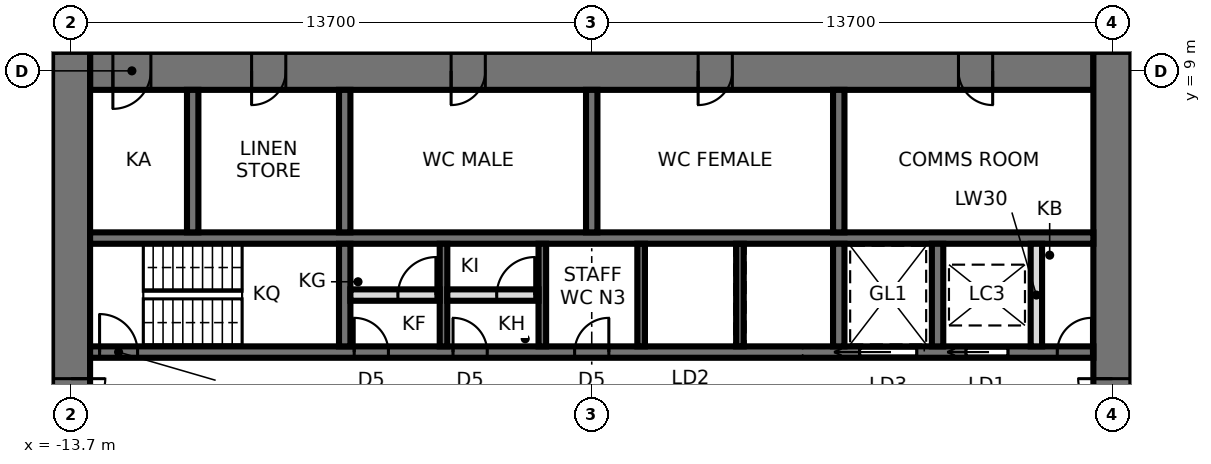
"""IFC4 building model, lengths in metres.
Left out: names, types, materials, properties, quantities, classifications, styles, units other than length and angle.
Written with IfcOpenShell. Run it as: python <this file> out.ifc"""

import sys

from ifc_helpers import new_model, si_unit, direction, frame, frame_2d, origin, place, context, subcontext, project, spatial, rectangle, extrude, element, fill, save


model = new_model("IFC4")
c1 = context("Model", 3, precision=1e-05, world=origin(), true_north=direction((0.0, 1.0)))
c2 = subcontext(c1, "Body", "Model", "MODEL_VIEW")
j1 = project(units=[si_unit("LENGTHUNIT", "METRE"), si_unit("PLANEANGLEUNIT", "RADIAN")], contexts=[c1])
p1 = place(None, origin())
s1 = spatial("IfcSite", under=j1, at=p1, CompositionType="ELEMENT")
p2 = place(p1, origin())
s2 = spatial("IfcBuilding", under=s1, at=p2, CompositionType="ELEMENT")
p3 = place(p2, frame((0.0, 0.0, 211.1)))
s3 = spatial("IfcBuildingStorey", under=s2, at=p3, CompositionType="ELEMENT", Elevation=211.1)
p4 = place(p3, frame((13.2, 9.0, 0.0), z_axis=(0.0, 0.0, 1.0), x_axis=(-1.0, 0.0, 0.0)))
e1 = element("IfcWall", 1, at=p4, inside=s3, PredefinedType="SHEAR", context=c2, shape_type="SweptSolid", body=[
    extrude(rectangle(XDim=26.4, YDim=1.0, at=frame_2d((13.2, 0.0))), origin(), (0.0, 0.0, 1.0), 3.9),
])
p5 = place(p4, frame((2.65, 0.0, 0.0)))
e2 = element("IfcOpeningElement", 2, at=p5, cuts=e1, PredefinedType="OPENING", context=c2, shape_type="SweptSolid", body=[
    extrude(rectangle(XDim=0.9, YDim=2.1, at=frame_2d((0.45, 1.05))), frame((0.0, 0.51, 0.0), z_axis=(0.0, -1.0, 0.0), x_axis=(1.0, 0.0, 0.0)), (0.0, 0.0, 1.0), 1.02),
])
p6 = place(p4, frame((9.5, 0.0, 0.0)))
e3 = element("IfcOpeningElement", 3, at=p6, cuts=e1, PredefinedType="OPENING", context=c2, shape_type="SweptSolid", body=[
    extrude(rectangle(XDim=0.9, YDim=2.1, at=frame_2d((0.45, 1.05))), frame((0.0, 0.51, 0.0), z_axis=(0.0, -1.0, 0.0), x_axis=(1.0, 0.0, 0.0)), (0.0, 0.0, 1.0), 1.02),
])
p7 = place(p4, frame((16.0, 0.0, 0.0)))
e4 = element("IfcOpeningElement", 4, at=p7, cuts=e1, PredefinedType="OPENING", context=c2, shape_type="SweptSolid", body=[
    extrude(rectangle(XDim=0.9, YDim=2.1, at=frame_2d((0.45, 1.05))), frame((0.0, 0.51, 0.0), z_axis=(0.0, -1.0, 0.0), x_axis=(1.0, 0.0, 0.0)), (0.0, 0.0, 1.0), 1.02),
])
p8 = place(p4, frame((21.25, 0.0, 0.0)))
e5 = element("IfcOpeningElement", 5, at=p8, cuts=e1, PredefinedType="OPENING", context=c2, shape_type="SweptSolid", body=[
    extrude(rectangle(XDim=0.9, YDim=2.1, at=frame_2d((0.45, 1.05))), frame((0.0, 0.51, 0.0), z_axis=(0.0, -1.0, 0.0), x_axis=(1.0, 0.0, 0.0)), (0.0, 0.0, 1.0), 1.02),
])
p9 = place(p4, frame((24.8, 0.0, 0.0)))
e6 = element("IfcOpeningElement", 6, at=p9, cuts=e1, PredefinedType="OPENING", context=c2, shape_type="SweptSolid", body=[
    extrude(rectangle(XDim=1.0, YDim=2.1, at=frame_2d((0.5, 1.05))), frame((0.0, 0.51, 0.0), z_axis=(0.0, -1.0, 0.0), x_axis=(1.0, 0.0, 0.0)), (0.0, 0.0, 1.0), 1.02),
])
p10 = place(p3, frame((13.7, -9.5, 0.0), z_axis=(0.0, 0.0, 1.0), x_axis=(0.0, 1.0, 0.0)))
e7 = element("IfcWall", 7, at=p10, inside=s3, PredefinedType="SHEAR", context=c2, shape_type="SweptSolid", body=[
    extrude(rectangle(XDim=19.0, YDim=1.0, at=frame_2d((9.5, 0.0))), origin(), (0.0, 0.0, 1.0), 3.9),
])
p11 = place(p10, frame((8.6, 0.0, 0.0)))
e8 = element("IfcOpeningElement", 8, at=p11, cuts=e7, PredefinedType="OPENING", context=c2, shape_type="SweptSolid", body=[
    extrude(rectangle(XDim=1.8, YDim=2.4, at=frame_2d((0.9, 1.2))), frame((0.0, 0.51, 0.0), z_axis=(0.0, -1.0, 0.0), x_axis=(1.0, 0.0, 0.0)), (0.0, 0.0, 1.0), 1.02),
])
p12 = place(p3, frame((-13.7, 9.5, 0.0), z_axis=(0.0, 0.0, 1.0), x_axis=(0.0, -1.0, 0.0)))
e9 = element("IfcWall", 9, at=p12, inside=s3, PredefinedType="SHEAR", context=c2, shape_type="SweptSolid", body=[
    extrude(rectangle(XDim=19.0, YDim=1.0, at=frame_2d((9.5, 0.0))), origin(), (0.0, 0.0, 1.0), 3.9),
])
p13 = place(p12, frame((8.6, 0.0, 0.0)))
e10 = element("IfcOpeningElement", 10, at=p13, cuts=e9, PredefinedType="OPENING", context=c2, shape_type="SweptSolid", body=[
    extrude(rectangle(XDim=1.8, YDim=2.4, at=frame_2d((0.9, 1.2))), frame((0.0, 0.51, 0.0), z_axis=(0.0, -1.0, 0.0), x_axis=(1.0, 0.0, 0.0)), (0.0, 0.0, 1.0), 1.02),
])
p14 = place(p3, frame((-13.2, 1.6, 0.0), z_axis=(0.0, 0.0, 1.0), x_axis=(1.0, 0.0, 0.0)))
e11 = element("IfcWall", 11, at=p14, inside=s3, PredefinedType="SHEAR", context=c2, shape_type="SweptSolid", body=[
    extrude(rectangle(XDim=26.4, YDim=0.3, at=frame_2d((13.2, 0.0))), origin(), (0.0, 0.0, 1.0), 3.9),
])
p15 = place(p14, frame((0.25, 0.0, 0.0)))
e12 = element("IfcOpeningElement", 12, at=p15, cuts=e11, PredefinedType="OPENING", context=c2, shape_type="SweptSolid", body=[
    extrude(rectangle(XDim=1.0, YDim=2.1, at=frame_2d((0.5, 1.05))), frame((0.0, 0.16, 0.0), z_axis=(0.0, -1.0, 0.0), x_axis=(1.0, 0.0, 0.0)), (0.0, 0.0, 1.0), 0.32),
])
p16 = place(p14, frame((23.05, 0.0, 0.0)))
e13 = element("IfcOpeningElement", 13, at=p16, cuts=e11, PredefinedType="OPENING", context=c2, shape_type="SweptSolid", body=[
    extrude(rectangle(XDim=1.1, YDim=2.3, at=frame_2d((0.55, 1.15))), frame((0.0, 0.16, 0.0), z_axis=(0.0, -1.0, 0.0), x_axis=(1.0, 0.0, 0.0)), (0.0, 0.0, 1.0), 0.32),
])
p17 = place(p14, frame((20.25, 0.0, 0.0)))
e14 = element("IfcOpeningElement", 14, at=p17, cuts=e11, PredefinedType="OPENING", context=c2, shape_type="SweptSolid", body=[
    extrude(rectangle(XDim=1.5, YDim=2.4, at=frame_2d((0.75, 1.2))), frame((0.0, 0.16, 0.0), z_axis=(0.0, -1.0, 0.0), x_axis=(1.0, 0.0, 0.0)), (0.0, 0.0, 1.0), 0.32),
])
p18 = place(p14, frame((6.95, 0.0, 0.0)))
e15 = element("IfcOpeningElement", 15, at=p18, cuts=e11, PredefinedType="OPENING", context=c2, shape_type="SweptSolid", body=[
    extrude(rectangle(XDim=0.9, YDim=2.1, at=frame_2d((0.45, 1.05))), frame((0.0, 0.16, 0.0), z_axis=(0.0, -1.0, 0.0), x_axis=(1.0, 0.0, 0.0)), (0.0, 0.0, 1.0), 0.32),
])
p19 = place(p14, frame((9.55, 0.0, 0.0)))
e16 = element("IfcOpeningElement", 16, at=p19, cuts=e11, PredefinedType="OPENING", context=c2, shape_type="SweptSolid", body=[
    extrude(rectangle(XDim=0.9, YDim=2.1, at=frame_2d((0.45, 1.05))), frame((0.0, 0.16, 0.0), z_axis=(0.0, -1.0, 0.0), x_axis=(1.0, 0.0, 0.0)), (0.0, 0.0, 1.0), 0.32),
])
p20 = place(p14, frame((12.75, 0.0, 0.0)))
e17 = element("IfcOpeningElement", 17, at=p20, cuts=e11, PredefinedType="OPENING", context=c2, shape_type="SweptSolid", body=[
    extrude(rectangle(XDim=0.9, YDim=2.1, at=frame_2d((0.45, 1.05))), frame((0.0, 0.16, 0.0), z_axis=(0.0, -1.0, 0.0), x_axis=(1.0, 0.0, 0.0)), (0.0, 0.0, 1.0), 0.32),
])
p21 = place(p14, frame((25.45, 0.0, 0.0)))
e18 = element("IfcOpeningElement", 18, at=p21, cuts=e11, PredefinedType="OPENING", context=c2, shape_type="SweptSolid", body=[
    extrude(rectangle(XDim=0.9, YDim=2.1, at=frame_2d((0.45, 1.05))), frame((0.0, 0.16, 0.0), z_axis=(0.0, -1.0, 0.0), x_axis=(1.0, 0.0, 0.0)), (0.0, 0.0, 1.0), 0.32),
])
p22 = place(p3, frame((-13.2, 4.6, 0.0), z_axis=(0.0, 0.0, 1.0), x_axis=(1.0, 0.0, 0.0)))
e19 = element("IfcWall", 19, at=p22, inside=s3, PredefinedType="SHEAR", context=c2, shape_type="SweptSolid", body=[
    extrude(rectangle(XDim=26.4, YDim=0.3, at=frame_2d((13.2, 0.0))), origin(), (0.0, 0.0, 1.0), 3.9),
])
p23 = place(p3, frame((-6.5, 1.75, 0.0), z_axis=(0.0, 0.0, 1.0), x_axis=(0.0, 1.0, 0.0)))
e20 = element("IfcWall", 20, at=p23, inside=s3, PredefinedType="SHEAR", context=c2, shape_type="SweptSolid", body=[
    extrude(rectangle(XDim=2.7, YDim=0.3, at=frame_2d((1.35, 0.0))), origin(), (0.0, 0.0, 1.0), 3.9),
])
p24 = place(p3, frame((-6.5, 4.75, 0.0), z_axis=(0.0, 0.0, 1.0), x_axis=(0.0, 1.0, 0.0)))
e21 = element("IfcWall", 21, at=p24, inside=s3, PredefinedType="SHEAR", context=c2, shape_type="SweptSolid", body=[
    extrude(rectangle(XDim=3.75, YDim=0.3, at=frame_2d((1.875, 0.0))), origin(), (0.0, 0.0, 1.0), 3.9),
])
p25 = place(p3, frame((6.5, 1.75, 0.0), z_axis=(0.0, 0.0, 1.0), x_axis=(0.0, 1.0, 0.0)))
e22 = element("IfcWall", 22, at=p25, inside=s3, PredefinedType="SHEAR", context=c2, shape_type="SweptSolid", body=[
    extrude(rectangle(XDim=2.7, YDim=0.3, at=frame_2d((1.35, 0.0))), origin(), (0.0, 0.0, 1.0), 3.9),
])
p26 = place(p3, frame((6.5, 4.75, 0.0), z_axis=(0.0, 0.0, 1.0), x_axis=(0.0, 1.0, 0.0)))
e23 = element("IfcWall", 23, at=p26, inside=s3, PredefinedType="SHEAR", context=c2, shape_type="SweptSolid", body=[
    extrude(rectangle(XDim=3.75, YDim=0.3, at=frame_2d((1.875, 0.0))), origin(), (0.0, 0.0, 1.0), 3.9),
])
for number, where, z_axis, x_axis in (
    (24, (-3.9, 1.75, 0.0), (0.0, 0.0, 1.0), (0.0, 1.0, 0.0)),
    (25, (-1.3, 1.75, 0.0), (0.0, 0.0, 1.0), (0.0, 1.0, 0.0)),
    (26, (1.3, 1.75, 0.0), (0.0, 0.0, 1.0), (0.0, 1.0, 0.0)),
    (27, (3.9, 1.75, 0.0), (0.0, 0.0, 1.0), (0.0, 1.0, 0.0)),
):
    element("IfcWall", number, at=place(p3, frame(where, z_axis=z_axis, x_axis=x_axis)), inside=s3, PredefinedType="SHEAR", context=c2, shape_type="SweptSolid", body=[
        extrude(rectangle(XDim=2.7, YDim=0.2, at=frame_2d((1.35, 0.0))), origin(), (0.0, 0.0, 1.0), 3.9),
    ])
for number, where, z_axis, x_axis in (
    (28, (0.0, 4.75, 0.0), (0.0, 0.0, 1.0), (0.0, 1.0, 0.0)),
    (29, (-10.5, 4.75, 0.0), (0.0, 0.0, 1.0), (0.0, 1.0, 0.0)),
):
    element("IfcWall", number, at=place(p3, frame(where, z_axis=z_axis, x_axis=x_axis)), inside=s3, PredefinedType="SHEAR", context=c2, shape_type="SweptSolid", body=[
        extrude(rectangle(XDim=3.75, YDim=0.3, at=frame_2d((1.875, 0.0))), origin(), (0.0, 0.0, 1.0), 3.9),
    ])
p27 = place(p3, frame((9.1, 1.75, 0.0), z_axis=(0.0, 0.0, 1.0), x_axis=(0.0, 1.0, 0.0)))
e30 = element("IfcWall", 30, at=p27, inside=s3, PredefinedType="SHEAR", context=c2, shape_type="SweptSolid", body=[
    extrude(rectangle(XDim=2.7, YDim=0.3, at=frame_2d((1.35, 0.0))), origin(), (0.0, 0.0, 1.0), 3.9),
])
p28 = place(p3, frame((-6.35, 3.1, 0.0), z_axis=(0.0, 0.0, 1.0), x_axis=(1.0, 0.0, 0.0)))
e31 = element("IfcWall", 31, at=p28, inside=s3, PredefinedType="PARTITIONING", context=c2, shape_type="SweptSolid", body=[
    extrude(rectangle(XDim=2.35, YDim=0.3, at=frame_2d((1.175, 0.0))), origin(), (0.0, 0.0, 1.0), 3.74),
])
p29 = place(p28, frame((1.25, 0.0, 0.0)))
e32 = element("IfcOpeningElement", 32, at=p29, cuts=e31, PredefinedType="OPENING", context=c2, shape_type="SweptSolid", body=[
    extrude(rectangle(XDim=1.0, YDim=2.4, at=frame_2d((0.5, 1.2))), frame((0.0, 0.16, 0.0), z_axis=(0.0, -1.0, 0.0), x_axis=(1.0, 0.0, 0.0)), (0.0, 0.0, 1.0), 0.32),
])
p30 = place(p3, frame((-3.8, 3.1, 0.0), z_axis=(0.0, 0.0, 1.0), x_axis=(1.0, 0.0, 0.0)))
e33 = element("IfcWall", 33, at=p30, inside=s3, PredefinedType="PARTITIONING", context=c2, shape_type="SweptSolid", body=[
    extrude(rectangle(XDim=2.4, YDim=0.3, at=frame_2d((1.2, 0.0))), origin(), (0.0, 0.0, 1.0), 3.74),
])
p31 = place(p30, frame((1.3, 0.0, 0.0)))
e34 = element("IfcOpeningElement", 34, at=p31, cuts=e33, PredefinedType="OPENING", context=c2, shape_type="SweptSolid", body=[
    extrude(rectangle(XDim=1.0, YDim=2.4, at=frame_2d((0.5, 1.2))), frame((0.0, 0.16, 0.0), z_axis=(0.0, -1.0, 0.0), x_axis=(1.0, 0.0, 0.0)), (0.0, 0.0, 1.0), 0.32),
])
p32 = place(p3, frame((11.7, 1.75, 0.0), z_axis=(0.0, 0.0, 1.0), x_axis=(0.0, 1.0, 0.0)))
e35 = element("IfcWall", 35, at=p32, inside=s3, PredefinedType="SOLIDWALL", context=c2, shape_type="SweptSolid", body=[
    extrude(rectangle(XDim=2.7, YDim=0.3, at=frame_2d((1.35, 0.0))), origin(), (0.0, 0.0, 1.0), 3.74),
])
p33 = place(p13, origin())
e36 = element("IfcDoor", 36, at=p33, inside=s3, OperationType="DOUBLE_DOOR_SINGLE_SWING", PredefinedType="DOOR", context=c2, shape_type="SweptSolid", body=[
    extrude(rectangle(XDim=1.72, YDim=2.36, at=frame_2d((0.9, 1.18))), frame((0.0, 0.025, 0.0), z_axis=(0.0, -1.0, 0.0), x_axis=(1.0, 0.0, 0.0)), (0.0, 0.0, 1.0), 0.05),
    extrude(rectangle(XDim=0.04, YDim=2.4, at=frame_2d((0.02, 1.2))), frame((0.0, 0.25, 0.0), z_axis=(0.0, -1.0, 0.0), x_axis=(1.0, 0.0, 0.0)), (0.0, 0.0, 1.0), 0.5),
    extrude(rectangle(XDim=0.04, YDim=2.4, at=frame_2d((1.78, 1.2))), frame((0.0, 0.25, 0.0), z_axis=(0.0, -1.0, 0.0), x_axis=(1.0, 0.0, 0.0)), (0.0, 0.0, 1.0), 0.5),
    extrude(rectangle(XDim=1.72, YDim=0.04, at=frame_2d((0.9, 2.38))), frame((0.0, 0.25, 0.0), z_axis=(0.0, -1.0, 0.0), x_axis=(1.0, 0.0, 0.0)), (0.0, 0.0, 1.0), 0.5),
])
fill(e10, e36)
p34 = place(p11, origin())
e37 = element("IfcDoor", 37, at=p34, inside=s3, OperationType="DOUBLE_DOOR_SINGLE_SWING", PredefinedType="DOOR", context=c2, shape_type="SweptSolid", body=[
    extrude(rectangle(XDim=1.72, YDim=2.36, at=frame_2d((0.9, 1.18))), frame((0.0, 0.025, 0.0), z_axis=(0.0, -1.0, 0.0), x_axis=(1.0, 0.0, 0.0)), (0.0, 0.0, 1.0), 0.05),
    extrude(rectangle(XDim=0.04, YDim=2.4, at=frame_2d((0.02, 1.2))), frame((0.0, 0.25, 0.0), z_axis=(0.0, -1.0, 0.0), x_axis=(1.0, 0.0, 0.0)), (0.0, 0.0, 1.0), 0.5),
    extrude(rectangle(XDim=0.04, YDim=2.4, at=frame_2d((1.78, 1.2))), frame((0.0, 0.25, 0.0), z_axis=(0.0, -1.0, 0.0), x_axis=(1.0, 0.0, 0.0)), (0.0, 0.0, 1.0), 0.5),
    extrude(rectangle(XDim=1.72, YDim=0.04, at=frame_2d((0.9, 2.38))), frame((0.0, 0.25, 0.0), z_axis=(0.0, -1.0, 0.0), x_axis=(1.0, 0.0, 0.0)), (0.0, 0.0, 1.0), 0.5),
])
fill(e8, e37)
p35 = place(p15, origin())
e38 = element("IfcDoor", 38, at=p35, inside=s3, OperationType="SINGLE_SWING_LEFT", PredefinedType="DOOR", context=c2, shape_type="SweptSolid", body=[
    extrude(rectangle(XDim=1.0, YDim=2.1, at=frame_2d((0.5, 1.05))), frame((0.0, 0.025, 0.0), z_axis=(0.0, -1.0, 0.0), x_axis=(1.0, 0.0, 0.0)), (0.0, 0.0, 1.0), 0.05),
])
fill(e12, e38)
p36 = place(p16, origin())
e39 = element("IfcDoor", 39, at=p36, inside=s3, OperationType="SLIDING_TO_LEFT", PredefinedType="DOOR", context=c2, shape_type="SweptSolid", body=[
    extrude(rectangle(XDim=1.1, YDim=2.3, at=frame_2d((0.55, 1.15))), frame((0.0, 0.025, 0.0), z_axis=(0.0, -1.0, 0.0), x_axis=(1.0, 0.0, 0.0)), (0.0, 0.0, 1.0), 0.05),
])
fill(e13, e39)
p37 = place(p17, origin())
e40 = element("IfcDoor", 40, at=p37, inside=s3, OperationType="SLIDING_TO_LEFT", PredefinedType="DOOR", context=c2, shape_type="SweptSolid", body=[
    extrude(rectangle(XDim=1.5, YDim=2.4, at=frame_2d((0.75, 1.2))), frame((0.0, 0.025, 0.0), z_axis=(0.0, -1.0, 0.0), x_axis=(1.0, 0.0, 0.0)), (0.0, 0.0, 1.0), 0.05),
])
fill(e14, e40)
p38 = place(p29, origin())
e41 = element("IfcDoor", 41, at=p38, inside=s3, OperationType="SINGLE_SWING_RIGHT", PredefinedType="DOOR", context=c2, shape_type="SweptSolid", body=[
    extrude(rectangle(XDim=1.0, YDim=2.4, at=frame_2d((0.5, 1.2))), frame((0.0, 0.025, 0.0), z_axis=(0.0, -1.0, 0.0), x_axis=(1.0, 0.0, 0.0)), (0.0, 0.0, 1.0), 0.05),
])
fill(e32, e41)
p39 = place(p18, origin())
e42 = element("IfcDoor", 42, at=p39, inside=s3, OperationType="SINGLE_SWING_LEFT", PredefinedType="DOOR", context=c2, shape_type="SweptSolid", body=[
    extrude(rectangle(XDim=0.9, YDim=2.1, at=frame_2d((0.45, 1.05))), frame((0.0, 0.025, 0.0), z_axis=(0.0, -1.0, 0.0), x_axis=(1.0, 0.0, 0.0)), (0.0, 0.0, 1.0), 0.05),
])
fill(e15, e42)
p40 = place(p31, origin())
e43 = element("IfcDoor", 43, at=p40, inside=s3, OperationType="SINGLE_SWING_RIGHT", PredefinedType="DOOR", context=c2, shape_type="SweptSolid", body=[
    extrude(rectangle(XDim=1.0, YDim=2.4, at=frame_2d((0.5, 1.2))), frame((0.0, 0.025, 0.0), z_axis=(0.0, -1.0, 0.0), x_axis=(1.0, 0.0, 0.0)), (0.0, 0.0, 1.0), 0.05),
])
fill(e34, e43)
p41 = place(p19, origin())
e44 = element("IfcDoor", 44, at=p41, inside=s3, OperationType="SINGLE_SWING_LEFT", PredefinedType="DOOR", context=c2, shape_type="SweptSolid", body=[
    extrude(rectangle(XDim=0.9, YDim=2.1, at=frame_2d((0.45, 1.05))), frame((0.0, 0.025, 0.0), z_axis=(0.0, -1.0, 0.0), x_axis=(1.0, 0.0, 0.0)), (0.0, 0.0, 1.0), 0.05),
])
fill(e16, e44)
p42 = place(p20, origin())
e45 = element("IfcDoor", 45, at=p42, inside=s3, OperationType="SINGLE_SWING_RIGHT", PredefinedType="DOOR", context=c2, shape_type="SweptSolid", body=[
    extrude(rectangle(XDim=0.9, YDim=2.1, at=frame_2d((0.45, 1.05))), frame((0.0, 0.025, 0.0), z_axis=(0.0, -1.0, 0.0), x_axis=(1.0, 0.0, 0.0)), (0.0, 0.0, 1.0), 0.05),
])
fill(e17, e45)
p43 = place(p21, origin())
e46 = element("IfcDoor", 46, at=p43, inside=s3, OperationType="SINGLE_SWING_RIGHT", PredefinedType="DOOR", context=c2, shape_type="SweptSolid", body=[
    extrude(rectangle(XDim=0.9, YDim=2.1, at=frame_2d((0.45, 1.05))), frame((0.0, 0.025, 0.0), z_axis=(0.0, -1.0, 0.0), x_axis=(1.0, 0.0, 0.0)), (0.0, 0.0, 1.0), 0.05),
])
fill(e18, e46)
p44 = place(p5, origin())
e47 = element("IfcDoor", 47, at=p44, inside=s3, OperationType="SINGLE_SWING_LEFT", PredefinedType="DOOR", context=c2, shape_type="SweptSolid", body=[
    extrude(rectangle(XDim=0.82, YDim=2.06, at=frame_2d((0.45, 1.03))), frame((0.0, 0.025, 0.0), z_axis=(0.0, -1.0, 0.0), x_axis=(1.0, 0.0, 0.0)), (0.0, 0.0, 1.0), 0.05),
    extrude(rectangle(XDim=0.04, YDim=2.1, at=frame_2d((0.02, 1.05))), frame((0.0, 0.25, 0.0), z_axis=(0.0, -1.0, 0.0), x_axis=(1.0, 0.0, 0.0)), (0.0, 0.0, 1.0), 0.5),
    extrude(rectangle(XDim=0.04, YDim=2.1, at=frame_2d((0.88, 1.05))), frame((0.0, 0.25, 0.0), z_axis=(0.0, -1.0, 0.0), x_axis=(1.0, 0.0, 0.0)), (0.0, 0.0, 1.0), 0.5),
    extrude(rectangle(XDim=0.82, YDim=0.04, at=frame_2d((0.45, 2.08))), frame((0.0, 0.25, 0.0), z_axis=(0.0, -1.0, 0.0), x_axis=(1.0, 0.0, 0.0)), (0.0, 0.0, 1.0), 0.5),
])
fill(e2, e47)
p45 = place(p6, origin())
e48 = element("IfcDoor", 48, at=p45, inside=s3, OperationType="SINGLE_SWING_RIGHT", PredefinedType="DOOR", context=c2, shape_type="SweptSolid", body=[
    extrude(rectangle(XDim=0.82, YDim=2.06, at=frame_2d((0.45, 1.03))), frame((0.0, 0.025, 0.0), z_axis=(0.0, -1.0, 0.0), x_axis=(1.0, 0.0, 0.0)), (0.0, 0.0, 1.0), 0.05),
    extrude(rectangle(XDim=0.04, YDim=2.1, at=frame_2d((0.02, 1.05))), frame((0.0, 0.25, 0.0), z_axis=(0.0, -1.0, 0.0), x_axis=(1.0, 0.0, 0.0)), (0.0, 0.0, 1.0), 0.5),
    extrude(rectangle(XDim=0.04, YDim=2.1, at=frame_2d((0.88, 1.05))), frame((0.0, 0.25, 0.0), z_axis=(0.0, -1.0, 0.0), x_axis=(1.0, 0.0, 0.0)), (0.0, 0.0, 1.0), 0.5),
    extrude(rectangle(XDim=0.82, YDim=0.04, at=frame_2d((0.45, 2.08))), frame((0.0, 0.25, 0.0), z_axis=(0.0, -1.0, 0.0), x_axis=(1.0, 0.0, 0.0)), (0.0, 0.0, 1.0), 0.5),
])
fill(e3, e48)
p46 = place(p7, origin())
e49 = element("IfcDoor", 49, at=p46, inside=s3, OperationType="SINGLE_SWING_RIGHT", PredefinedType="DOOR", context=c2, shape_type="SweptSolid", body=[
    extrude(rectangle(XDim=0.82, YDim=2.06, at=frame_2d((0.45, 1.03))), frame((0.0, 0.025, 0.0), z_axis=(0.0, -1.0, 0.0), x_axis=(1.0, 0.0, 0.0)), (0.0, 0.0, 1.0), 0.05),
    extrude(rectangle(XDim=0.04, YDim=2.1, at=frame_2d((0.02, 1.05))), frame((0.0, 0.25, 0.0), z_axis=(0.0, -1.0, 0.0), x_axis=(1.0, 0.0, 0.0)), (0.0, 0.0, 1.0), 0.5),
    extrude(rectangle(XDim=0.04, YDim=2.1, at=frame_2d((0.88, 1.05))), frame((0.0, 0.25, 0.0), z_axis=(0.0, -1.0, 0.0), x_axis=(1.0, 0.0, 0.0)), (0.0, 0.0, 1.0), 0.5),
    extrude(rectangle(XDim=0.82, YDim=0.04, at=frame_2d((0.45, 2.08))), frame((0.0, 0.25, 0.0), z_axis=(0.0, -1.0, 0.0), x_axis=(1.0, 0.0, 0.0)), (0.0, 0.0, 1.0), 0.5),
])
fill(e4, e49)
p47 = place(p8, origin())
e50 = element("IfcDoor", 50, at=p47, inside=s3, OperationType="SINGLE_SWING_RIGHT", PredefinedType="DOOR", context=c2, shape_type="SweptSolid", body=[
    extrude(rectangle(XDim=0.82, YDim=2.06, at=frame_2d((0.45, 1.03))), frame((0.0, 0.025, 0.0), z_axis=(0.0, -1.0, 0.0), x_axis=(1.0, 0.0, 0.0)), (0.0, 0.0, 1.0), 0.05),
    extrude(rectangle(XDim=0.04, YDim=2.1, at=frame_2d((0.02, 1.05))), frame((0.0, 0.25, 0.0), z_axis=(0.0, -1.0, 0.0), x_axis=(1.0, 0.0, 0.0)), (0.0, 0.0, 1.0), 0.5),
    extrude(rectangle(XDim=0.04, YDim=2.1, at=frame_2d((0.88, 1.05))), frame((0.0, 0.25, 0.0), z_axis=(0.0, -1.0, 0.0), x_axis=(1.0, 0.0, 0.0)), (0.0, 0.0, 1.0), 0.5),
    extrude(rectangle(XDim=0.82, YDim=0.04, at=frame_2d((0.45, 2.08))), frame((0.0, 0.25, 0.0), z_axis=(0.0, -1.0, 0.0), x_axis=(1.0, 0.0, 0.0)), (0.0, 0.0, 1.0), 0.5),
])
fill(e5, e50)
p48 = place(p9, origin())
e51 = element("IfcDoor", 51, at=p48, inside=s3, OperationType="SINGLE_SWING_RIGHT", PredefinedType="DOOR", context=c2, shape_type="SweptSolid", body=[
    extrude(rectangle(XDim=0.92, YDim=2.06, at=frame_2d((0.5, 1.03))), frame((0.0, 0.025, 0.0), z_axis=(0.0, -1.0, 0.0), x_axis=(1.0, 0.0, 0.0)), (0.0, 0.0, 1.0), 0.05),
    extrude(rectangle(XDim=0.04, YDim=2.1, at=frame_2d((0.02, 1.05))), frame((0.0, 0.25, 0.0), z_axis=(0.0, -1.0, 0.0), x_axis=(1.0, 0.0, 0.0)), (0.0, 0.0, 1.0), 0.5),
    extrude(rectangle(XDim=0.04, YDim=2.1, at=frame_2d((0.98, 1.05))), frame((0.0, 0.25, 0.0), z_axis=(0.0, -1.0, 0.0), x_axis=(1.0, 0.0, 0.0)), (0.0, 0.0, 1.0), 0.5),
    extrude(rectangle(XDim=0.92, YDim=0.04, at=frame_2d((0.5, 2.08))), frame((0.0, 0.25, 0.0), z_axis=(0.0, -1.0, 0.0), x_axis=(1.0, 0.0, 0.0)), (0.0, 0.0, 1.0), 0.5),
])
fill(e6, e51)
save(model, sys.argv[1])
